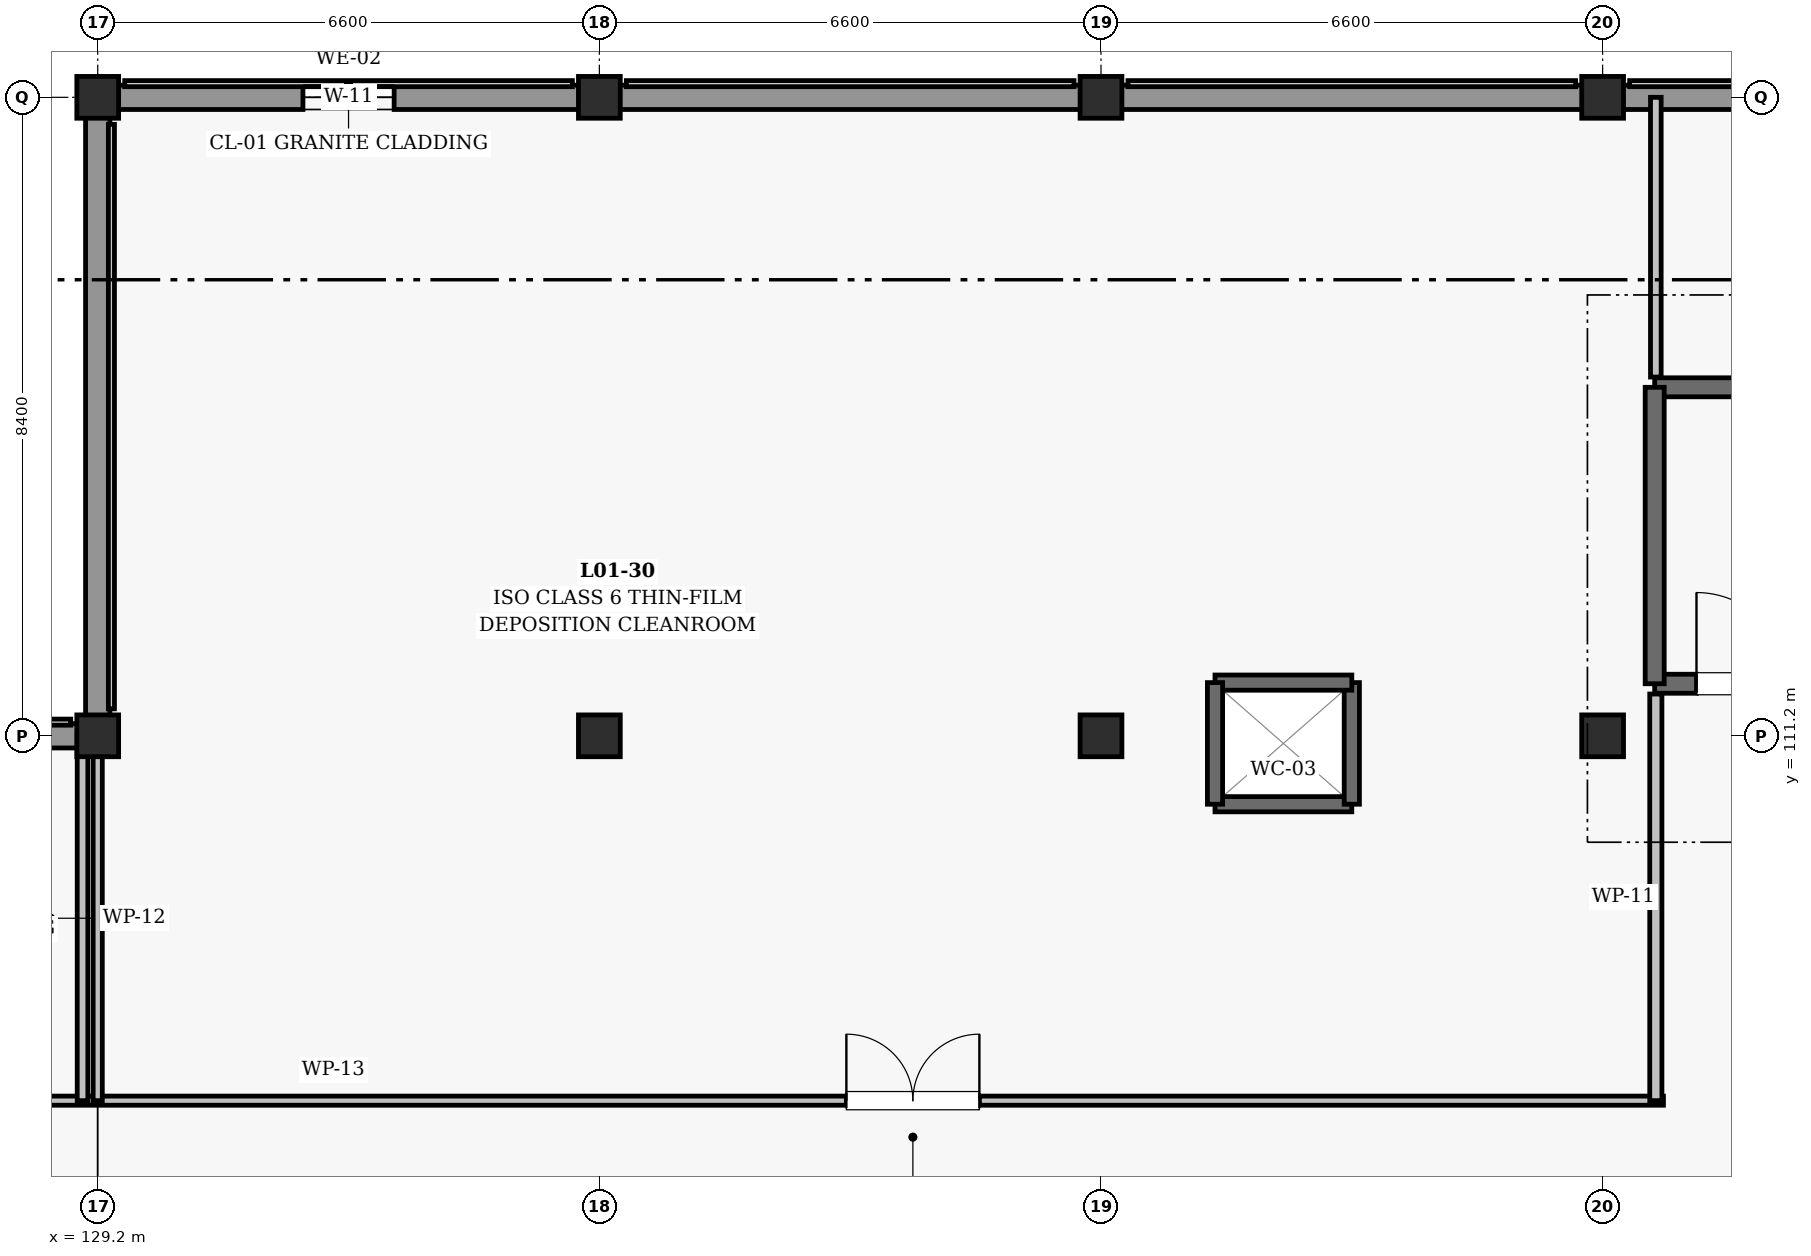
"""IFC4 building model, lengths in metres.
Left out: names, types, materials, properties, quantities, classifications, styles, units other than length and angle.
Written with IfcOpenShell. Run it as: python <this file> out.ifc"""

import sys

from ifc_helpers import new_model, si_unit, direction, frame, frame_2d, origin, origin_2d, place, context, subcontext, project, spatial, rectangle, extrude, element, fill, save


model = new_model("IFC4")
c1 = context("Model", 3, precision=1e-05, world=origin(), true_north=direction((0.0, 1.0)))
c2 = subcontext(c1, "Body", "Model", "MODEL_VIEW")
j1 = project(units=[si_unit("LENGTHUNIT", "METRE"), si_unit("PLANEANGLEUNIT", "RADIAN")], contexts=[c1])
p1 = place(None, origin())
s1 = spatial("IfcSite", under=j1, at=p1, CompositionType="ELEMENT")
p2 = place(p1, origin())
s2 = spatial("IfcBuilding", under=s1, at=p2, CompositionType="ELEMENT")
p3 = place(p2, frame((0.0, 0.0, 5.4)))
s3 = spatial("IfcBuildingStorey", under=s2, at=p3, CompositionType="ELEMENT", Elevation=5.4)
for number, where, z_axis, x_axis in (
    (1, (129.2, 111.2, 0.0), (0.0, 0.0, 1.0), (1.0, 0.0, 0.0)),
    (2, (129.2, 119.6, 0.0), (0.0, 0.0, 1.0), (1.0, 0.0, 0.0)),
    (3, (135.8, 111.2, 0.0), (0.0, 0.0, 1.0), (1.0, 0.0, 0.0)),
    (4, (135.8, 119.6, 0.0), (0.0, 0.0, 1.0), (1.0, 0.0, 0.0)),
    (5, (142.4, 111.2, 0.0), (0.0, 0.0, 1.0), (1.0, 0.0, 0.0)),
    (6, (142.4, 119.6, 0.0), (0.0, 0.0, 1.0), (1.0, 0.0, 0.0)),
    (7, (149.0, 111.2, 0.0), (0.0, 0.0, 1.0), (1.0, 0.0, 0.0)),
    (8, (149.0, 119.6, 0.0), (0.0, 0.0, 1.0), (1.0, 0.0, 0.0)),
):
    element("IfcColumn", number, at=place(p3, frame(where, z_axis=z_axis, x_axis=x_axis)), inside=s3, PredefinedType="COLUMN", context=c2, shape_type="SweptSolid", body=[
        extrude(rectangle(XDim=0.55, YDim=0.55, at=origin_2d()), origin(), (0.0, 0.0, 1.0), 4.5),
    ])
p4 = place(p3, frame((122.205, 111.2, 0.0), z_axis=(0.0, 0.0, 1.0), x_axis=(1.0, 0.0, 0.0)))
e9 = element("IfcWall", 9, at=p4, inside=s3, PredefinedType="SOLIDWALL", context=c2, shape_type="SweptSolid", body=[
    extrude(rectangle(XDim=6.74, YDim=0.32, at=frame_2d((3.37, 0.0))), origin(), (0.0, 0.0, 1.0), 3.305),
])
p5 = place(p4, frame((2.62, 0.0, 1.85)))
e10 = element("IfcOpeningElement", 10, at=p5, cuts=e9, PredefinedType="OPENING", context=c2, shape_type="SweptSolid", body=[
    extrude(rectangle(XDim=1.5, YDim=1.1, at=frame_2d((0.75, 0.55))), frame((0.0, 0.17, 0.0), z_axis=(0.0, -1.0, 0.0), x_axis=(1.0, 0.0, 0.0)), (0.0, 0.0, 1.0), 0.34),
])
p6 = place(p3, frame((129.455, 119.6, 0.0), z_axis=(0.0, 0.0, 1.0), x_axis=(1.0, 0.0, 0.0)))
e11 = element("IfcWall", 11, at=p6, inside=s3, PredefinedType="SOLIDWALL", context=c2, shape_type="SweptSolid", body=[
    extrude(rectangle(XDim=6.09, YDim=0.32, at=frame_2d((3.045, 0.0))), origin(), (0.0, 0.0, 1.0), 3.355),
])
p7 = place(p6, frame((2.445, 0.0, 1.85)))
e12 = element("IfcOpeningElement", 12, at=p7, cuts=e11, PredefinedType="OPENING", context=c2, shape_type="SweptSolid", body=[
    extrude(rectangle(XDim=1.2, YDim=1.1, at=frame_2d((0.6, 0.55))), frame((0.0, 0.17, 0.0), z_axis=(0.0, -1.0, 0.0), x_axis=(1.0, 0.0, 0.0)), (0.0, 0.0, 1.0), 0.34),
])
for number, where, z_axis, x_axis in (
    (13, (136.055, 119.6, 0.0), (0.0, 0.0, 1.0), (1.0, 0.0, 0.0)),
    (14, (142.655, 119.6, 0.0), (0.0, 0.0, 1.0), (1.0, 0.0, 0.0)),
):
    element("IfcWall", number, at=place(p3, frame(where, z_axis=z_axis, x_axis=x_axis)), inside=s3, PredefinedType="SOLIDWALL", context=c2, shape_type="SweptSolid", body=[
        extrude(rectangle(XDim=6.09, YDim=0.32, at=frame_2d((3.045, 0.0))), origin(), (0.0, 0.0, 1.0), 2.955),
    ])
p8 = place(p3, frame((149.255, 119.6, 0.0), z_axis=(0.0, 0.0, 1.0), x_axis=(1.0, 0.0, 0.0)))
e15 = element("IfcWall", 15, at=p8, inside=s3, PredefinedType="SOLIDWALL", context=c2, shape_type="SweptSolid", body=[
    extrude(rectangle(XDim=6.09, YDim=0.32, at=frame_2d((3.045, 0.0))), origin(), (0.0, 0.0, 1.0), 3.355),
])
p9 = place(p3, frame((129.2, 111.455, 0.0), z_axis=(0.0, 0.0, 1.0), x_axis=(0.0, 1.0, 0.0)))
e16 = element("IfcWall", 16, at=p9, inside=s3, PredefinedType="SOLIDWALL", context=c2, shape_type="SweptSolid", body=[
    extrude(rectangle(XDim=7.89, YDim=0.32, at=frame_2d((3.945, 0.0))), origin(), (0.0, 0.0, 1.0), 3.355),
])
p10 = place(p3, frame((149.685, 111.885, 0.0), z_axis=(0.0, 0.0, 1.0), x_axis=(1.0, 0.0, 0.0)))
e17 = element("IfcWall", 17, at=p10, inside=s3, PredefinedType="SHEAR", context=c2, shape_type="SweptSolid", body=[
    extrude(rectangle(XDim=10.63, YDim=0.25, at=frame_2d((5.315, 0.0))), origin(), (0.0, 0.0, 1.0), 4.235),
])
p11 = place(p10, frame((0.55, 0.0, 0.0)))
e18 = element("IfcOpeningElement", 18, at=p11, cuts=e17, PredefinedType="OPENING", context=c2, shape_type="SweptSolid", body=[
    extrude(rectangle(XDim=1.2, YDim=2.15, at=frame_2d((0.6, 1.075))), frame((0.0, 0.135, 0.0), z_axis=(0.0, -1.0, 0.0), x_axis=(1.0, 0.0, 0.0)), (0.0, 0.0, 1.0), 0.27),
])
p12 = place(p3, frame((160.315, 115.785, 0.0), z_axis=(0.0, 0.0, 1.0), x_axis=(-1.0, 0.0, 0.0)))
e19 = element("IfcWall", 19, at=p12, inside=s3, PredefinedType="SHEAR", context=c2, shape_type="SweptSolid", body=[
    extrude(rectangle(XDim=10.63, YDim=0.25, at=frame_2d((5.315, 0.0))), origin(), (0.0, 0.0, 1.0), 4.235),
])
p13 = place(p3, frame((149.685, 115.785, 0.0), z_axis=(0.0, 0.0, 1.0), x_axis=(0.0, -1.0, 0.0)))
e20 = element("IfcWall", 20, at=p13, inside=s3, PredefinedType="SHEAR", context=c2, shape_type="SweptSolid", body=[
    extrude(rectangle(XDim=3.9, YDim=0.25, at=frame_2d((1.95, 0.0))), origin(), (0.0, 0.0, 1.0), 4.235),
])
p14 = place(p3, frame((143.9, 110.3, 0.0), z_axis=(0.0, 0.0, 1.0), x_axis=(1.0, 0.0, 0.0)))
e21 = element("IfcWall", 21, at=p14, inside=s3, PredefinedType="SHEAR", context=c2, shape_type="SweptSolid", body=[
    extrude(rectangle(XDim=1.8, YDim=0.2, at=frame_2d((0.9, 0.0))), origin(), (0.0, 0.0, 1.0), 4.14),
])
p15 = place(p3, frame((145.7, 110.3, 0.0), z_axis=(0.0, 0.0, 1.0), x_axis=(0.0, 1.0, 0.0)))
e22 = element("IfcWall", 22, at=p15, inside=s3, PredefinedType="SHEAR", context=c2, shape_type="SweptSolid", body=[
    extrude(rectangle(XDim=1.6, YDim=0.2, at=frame_2d((0.8, 0.0))), origin(), (0.0, 0.0, 1.0), 4.14),
])
p16 = place(p3, frame((145.7, 111.9, 0.0), z_axis=(0.0, 0.0, 1.0), x_axis=(-1.0, 0.0, 0.0)))
e23 = element("IfcWall", 23, at=p16, inside=s3, PredefinedType="SHEAR", context=c2, shape_type="SweptSolid", body=[
    extrude(rectangle(XDim=1.8, YDim=0.2, at=frame_2d((0.9, 0.0))), origin(), (0.0, 0.0, 1.0), 4.14),
])
p17 = place(p3, frame((143.9, 111.9, 0.0), z_axis=(0.0, 0.0, 1.0), x_axis=(0.0, -1.0, 0.0)))
e24 = element("IfcWall", 24, at=p17, inside=s3, PredefinedType="SHEAR", context=c2, shape_type="SweptSolid", body=[
    extrude(rectangle(XDim=1.6, YDim=0.2, at=frame_2d((0.8, 0.0))), origin(), (0.0, 0.0, 1.0), 4.14),
])
p18 = place(p3, frame((114.8, 106.4, 0.0), z_axis=(0.0, 0.0, 1.0), x_axis=(1.0, 0.0, 0.0)))
e25 = element("IfcWall", 25, at=p18, inside=s3, PredefinedType="PARTITIONING", context=c2, shape_type="SweptSolid", body=[
    extrude(rectangle(XDim=35.0, YDim=0.12, at=frame_2d((17.5, 0.0))), origin(), (0.0, 0.0, 1.0), 2.96),
])
p19 = place(p18, frame((6.7, 0.0, 0.0)))
e26 = element("IfcOpeningElement", 26, at=p19, cuts=e25, PredefinedType="OPENING", context=c2, shape_type="SweptSolid", body=[
    extrude(rectangle(XDim=1.1, YDim=2.15, at=frame_2d((0.55, 1.075))), frame((0.0, 0.07, 0.0), z_axis=(0.0, -1.0, 0.0), x_axis=(1.0, 0.0, 0.0)), (0.0, 0.0, 1.0), 0.14),
])
p20 = place(p18, frame((24.25, 0.0, 0.0)))
e27 = element("IfcOpeningElement", 27, at=p20, cuts=e25, PredefinedType="OPENING", context=c2, shape_type="SweptSolid", body=[
    extrude(rectangle(XDim=1.75, YDim=2.25, at=frame_2d((0.875, 1.125))), frame((0.0, 0.07, 0.0), z_axis=(0.0, -1.0, 0.0), x_axis=(1.0, 0.0, 0.0)), (0.0, 0.0, 1.0), 0.14),
])
p21 = place(p3, frame((129.0, 106.4, 0.0), z_axis=(0.0, 0.0, 1.0), x_axis=(0.0, 1.0, 0.0)))
e28 = element("IfcWall", 28, at=p21, inside=s3, PredefinedType="PARTITIONING", context=c2, shape_type="SweptSolid", body=[
    extrude(rectangle(XDim=4.8, YDim=0.14, at=frame_2d((2.4, 0.0))), origin(), (0.0, 0.0, 1.0), 3.36),
])
p22 = place(p3, frame((129.2, 106.4, 0.0), z_axis=(0.0, 0.0, 1.0), x_axis=(0.0, 1.0, 0.0)))
e29 = element("IfcWall", 29, at=p22, inside=s3, PredefinedType="PARTITIONING", context=c2, shape_type="SweptSolid", body=[
    extrude(rectangle(XDim=4.8, YDim=0.12, at=frame_2d((2.4, 0.0))), origin(), (0.0, 0.0, 1.0), 3.36),
])
p23 = place(p3, frame((149.7, 106.4, 0.0), z_axis=(0.0, 0.0, 1.0), x_axis=(0.0, 1.0, 0.0)))
e30 = element("IfcWall", 30, at=p23, inside=s3, PredefinedType="PARTITIONING", context=c2, shape_type="SweptSolid", body=[
    extrude(rectangle(XDim=5.35, YDim=0.16, at=frame_2d((2.675, 0.0))), origin(), (0.0, 0.0, 1.0), 3.76),
])
p24 = place(p3, frame((149.7, 115.92, 0.0), z_axis=(0.0, 0.0, 1.0), x_axis=(0.0, 1.0, 0.0)))
e31 = element("IfcWall", 31, at=p24, inside=s3, PredefinedType="PARTITIONING", context=c2, shape_type="SweptSolid", body=[
    extrude(rectangle(XDim=3.68, YDim=0.14, at=frame_2d((1.84, 0.0))), origin(), (0.0, 0.0, 1.0), 3.71),
])
p25 = place(p7, origin())
e32 = element("IfcWindow", 32, at=p25, inside=s3, PartitioningType="SINGLE_PANEL", PredefinedType="WINDOW", context=c2, shape_type="SweptSolid", body=[
    extrude(rectangle(XDim=1.2, YDim=1.1, at=frame_2d((0.6, 0.55))), frame((0.0, 0.03, 0.0), z_axis=(0.0, -1.0, 0.0), x_axis=(1.0, 0.0, 0.0)), (0.0, 0.0, 1.0), 0.06),
])
fill(e12, e32)
p26 = place(p11, origin())
e33 = element("IfcDoor", 33, at=p26, inside=s3, OperationType="SINGLE_SWING_LEFT", PredefinedType="DOOR", context=c2, shape_type="SweptSolid", body=[
    extrude(rectangle(XDim=1.2, YDim=2.15, at=frame_2d((0.6, 1.075))), frame((0.0, 0.025, 0.0), z_axis=(0.0, -1.0, 0.0), x_axis=(1.0, 0.0, 0.0)), (0.0, 0.0, 1.0), 0.05),
])
fill(e18, e33)
p27 = place(p20, origin())
e34 = element("IfcDoor", 34, at=p27, inside=s3, OperationType="DOUBLE_DOOR_SINGLE_SWING", PredefinedType="DOOR", context=c2, shape_type="SweptSolid", body=[
    extrude(rectangle(XDim=1.75, YDim=2.25, at=frame_2d((0.875, 1.125))), frame((0.0, 0.025, 0.0), z_axis=(0.0, -1.0, 0.0), x_axis=(1.0, 0.0, 0.0)), (0.0, 0.0, 1.0), 0.05),
])
fill(e27, e34)
save(model, sys.argv[1])
